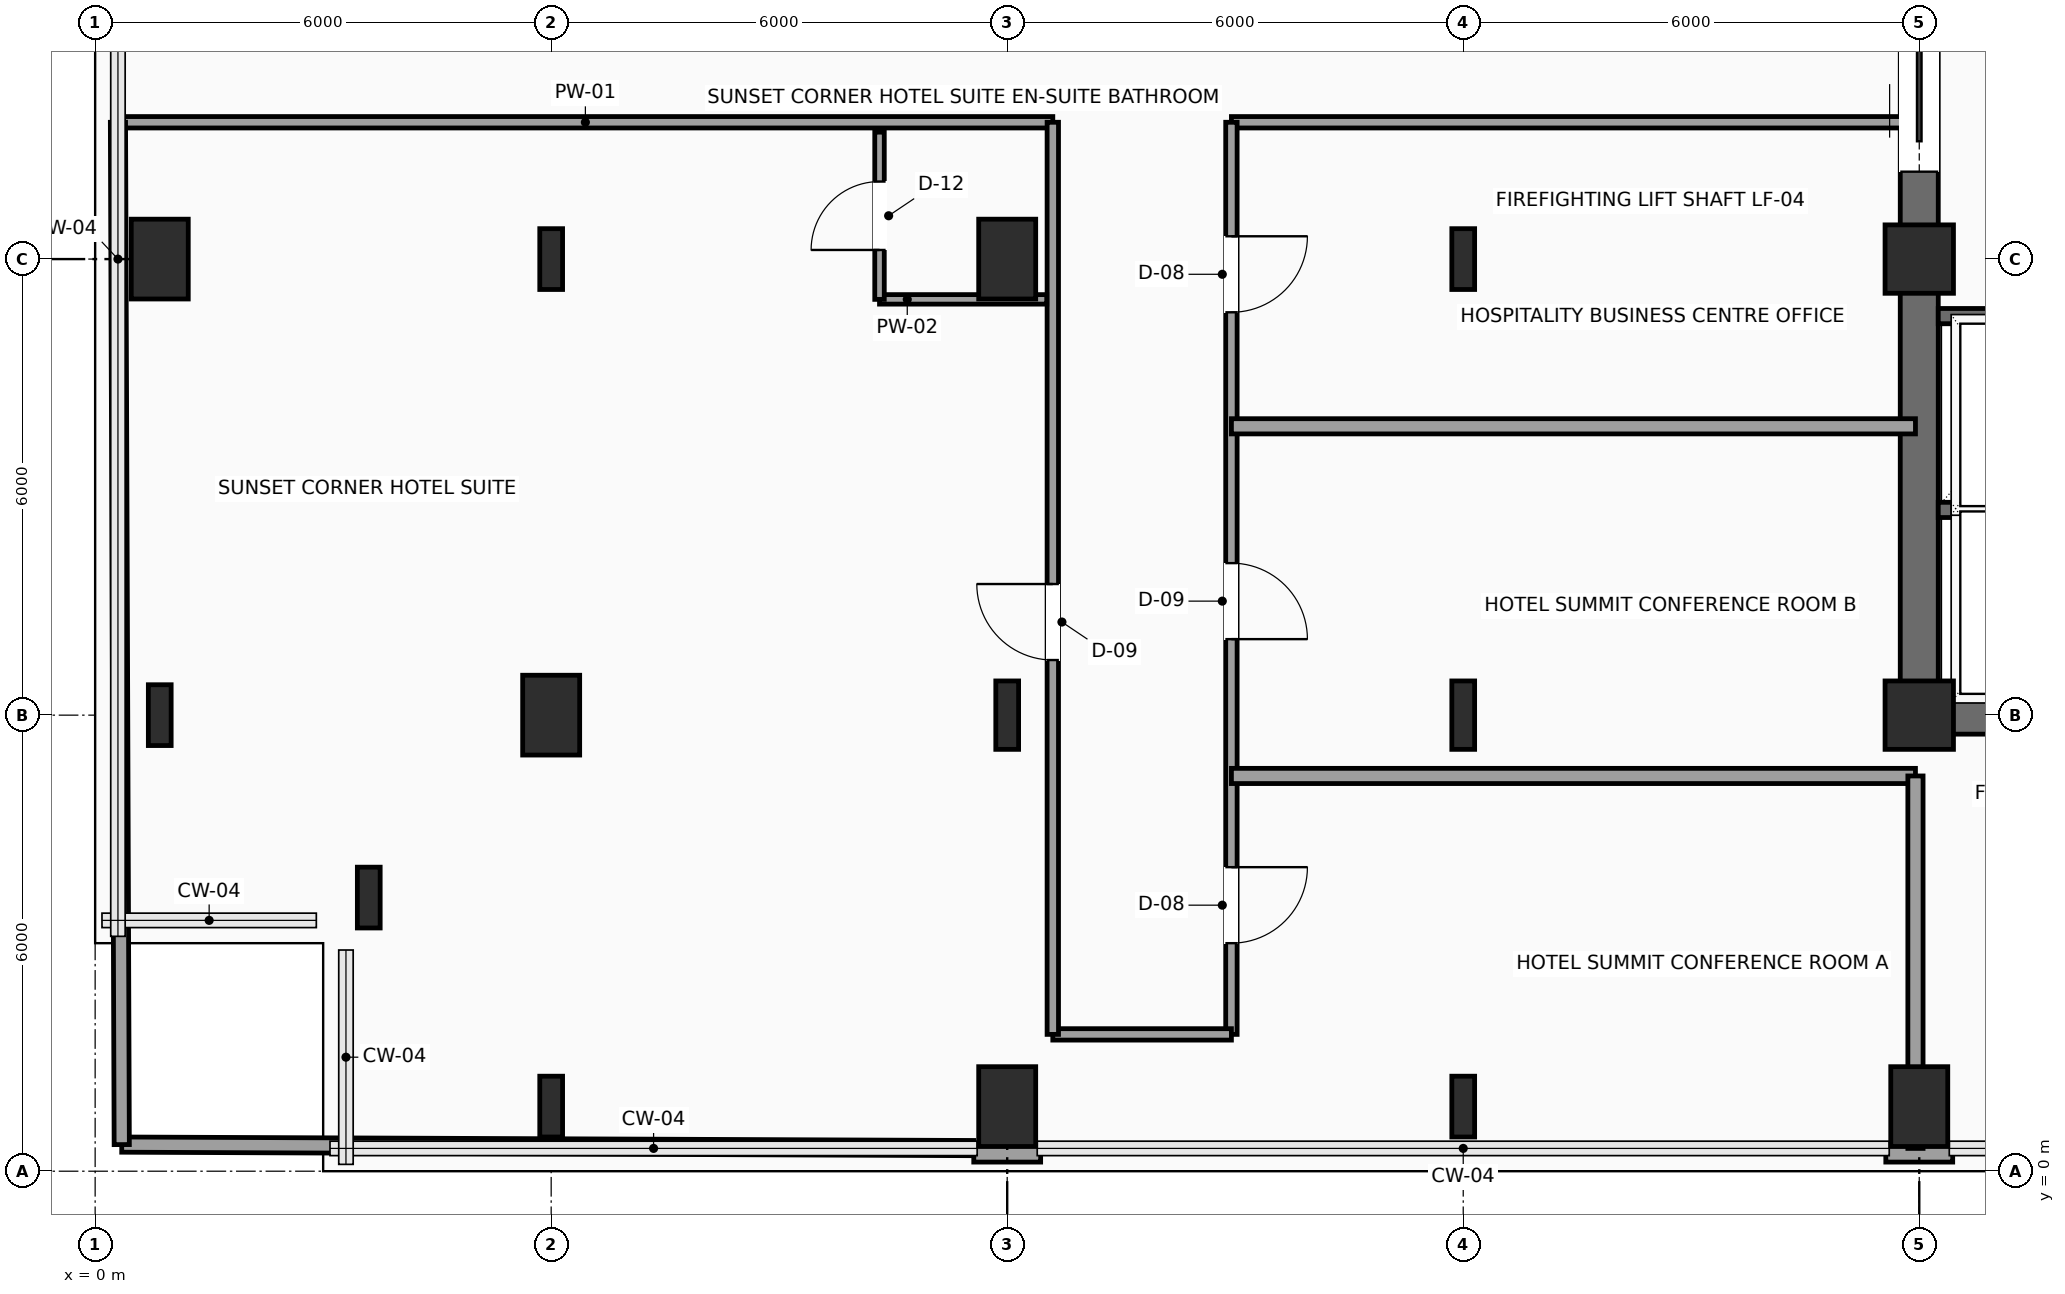
"""IFC4 building model, lengths in metres.
Left out: names, types, materials, properties, quantities, classifications, styles, units other than length and angle.
Written with IfcOpenShell. Run it as: python <this file> out.ifc"""

import sys

from ifc_helpers import new_model, si_unit, direction, frame, frame_2d, origin, origin_2d, place, context, subcontext, project, spatial, rectangle, i_section, extrude, element, fill, save


model = new_model("IFC4")
c1 = context("Model", 3, precision=1e-05, world=origin(), true_north=direction((0.0, 1.0)))
c2 = subcontext(c1, "Body", "Model", "MODEL_VIEW")
j1 = project(units=[si_unit("LENGTHUNIT", "METRE"), si_unit("PLANEANGLEUNIT", "RADIAN")], contexts=[c1])
p1 = place(None, origin())
s1 = spatial("IfcSite", under=j1, at=p1, CompositionType="ELEMENT")
p2 = place(p1, origin())
s2 = spatial("IfcBuilding", under=s1, at=p2, CompositionType="ELEMENT")
p3 = place(p2, frame((0.0, 0.0, 231.15)))
s3 = spatial("IfcBuildingStorey", under=s2, at=p3, CompositionType="ELEMENT", Elevation=231.15)
for number, where, z_axis, x_axis in (
    (1, (24.0, 6.0, 0.0), (0.0, 0.0, 1.0), (1.0, 0.0, 0.0)),
    (2, (24.0, 12.0, 0.0), (0.0, 0.0, 1.0), (1.0, 0.0, 0.0)),
):
    element("IfcColumn", number, at=place(p3, frame(where, z_axis=z_axis, x_axis=x_axis)), inside=s3, PredefinedType="COLUMN", context=c2, shape_type="SweptSolid", body=[
        extrude(rectangle(XDim=0.9, YDim=0.9, at=origin_2d()), origin(), (0.0, 0.0, 1.0), 3.75),
    ])
for number, where, z_axis, x_axis in (
    (3, (3.6, 3.6, 0.0), (0.0, 0.0, 1.0), (1.0, 0.0, 0.0)),
    (4, (0.85, 6.0, 0.0), (0.0, 0.0, 1.0), (1.0, 0.0, 0.0)),
):
    element("IfcColumn", number, at=place(p3, frame(where, z_axis=z_axis, x_axis=x_axis)), inside=s3, PredefinedType="COLUMN", context=c2, shape_type="SweptSolid", body=[
        extrude(i_section(OverallWidth=0.3, OverallDepth=0.8, WebThickness=0.018, FlangeThickness=0.033, FilletRadius=0.03, at=origin_2d()), origin(), (0.0, 0.0, 1.0), 3.75),
    ])
p4 = place(p3, frame((0.85, 12.0, 0.0), z_axis=(0.0, 0.0, 1.0), x_axis=(1.0, 0.0, 0.0)))
e5 = element("IfcColumn", 5, at=p4, inside=s3, PredefinedType="COLUMN", context=c2, shape_type="SweptSolid", body=[
    extrude(rectangle(XDim=0.75, YDim=1.05, at=origin_2d()), origin(), (0.0, 0.0, 1.0), 3.75),
])
p5 = place(p3, frame((6.0, 0.85, 0.0), z_axis=(0.0, 0.0, 1.0), x_axis=(1.0, 0.0, 0.0)))
e6 = element("IfcColumn", 6, at=p5, inside=s3, PredefinedType="COLUMN", context=c2, shape_type="SweptSolid", body=[
    extrude(i_section(OverallWidth=0.3, OverallDepth=0.8, WebThickness=0.018, FlangeThickness=0.033, FilletRadius=0.03, at=origin_2d()), origin(), (0.0, 0.0, 1.0), 3.75),
])
p6 = place(p3, frame((6.0, 6.0, 0.0), z_axis=(0.0, 0.0, 1.0), x_axis=(1.0, 0.0, 0.0)))
e7 = element("IfcColumn", 7, at=p6, inside=s3, PredefinedType="COLUMN", context=c2, shape_type="SweptSolid", body=[
    extrude(rectangle(XDim=0.75, YDim=1.05, at=origin_2d()), origin(), (0.0, 0.0, 1.0), 3.75),
])
p7 = place(p3, frame((6.0, 12.0, 0.0), z_axis=(0.0, 0.0, 1.0), x_axis=(1.0, 0.0, 0.0)))
e8 = element("IfcColumn", 8, at=p7, inside=s3, PredefinedType="COLUMN", context=c2, shape_type="SweptSolid", body=[
    extrude(i_section(OverallWidth=0.3, OverallDepth=0.8, WebThickness=0.018, FlangeThickness=0.033, FilletRadius=0.03, at=origin_2d()), origin(), (0.0, 0.0, 1.0), 3.75),
])
p8 = place(p3, frame((12.0, 0.85, 0.0), z_axis=(0.0, 0.0, 1.0), x_axis=(1.0, 0.0, 0.0)))
e9 = element("IfcColumn", 9, at=p8, inside=s3, PredefinedType="COLUMN", context=c2, shape_type="SweptSolid", body=[
    extrude(rectangle(XDim=0.75, YDim=1.05, at=origin_2d()), origin(), (0.0, 0.0, 1.0), 3.75),
])
p9 = place(p3, frame((12.0, 6.0, 0.0), z_axis=(0.0, 0.0, 1.0), x_axis=(1.0, 0.0, 0.0)))
e10 = element("IfcColumn", 10, at=p9, inside=s3, PredefinedType="COLUMN", context=c2, shape_type="SweptSolid", body=[
    extrude(i_section(OverallWidth=0.3, OverallDepth=0.9, WebThickness=0.019, FlangeThickness=0.035, FilletRadius=0.03, at=origin_2d()), origin(), (0.0, 0.0, 1.0), 3.75),
])
p10 = place(p3, frame((12.0, 12.0, 0.0), z_axis=(0.0, 0.0, 1.0), x_axis=(1.0, 0.0, 0.0)))
e11 = element("IfcColumn", 11, at=p10, inside=s3, PredefinedType="COLUMN", context=c2, shape_type="SweptSolid", body=[
    extrude(rectangle(XDim=0.75, YDim=1.05, at=origin_2d()), origin(), (0.0, 0.0, 1.0), 3.75),
])
p11 = place(p3, frame((18.0, 0.85, 0.0), z_axis=(0.0, 0.0, 1.0), x_axis=(1.0, 0.0, 0.0)))
e12 = element("IfcColumn", 12, at=p11, inside=s3, PredefinedType="COLUMN", context=c2, shape_type="SweptSolid", body=[
    extrude(i_section(OverallWidth=0.3, OverallDepth=0.8, WebThickness=0.018, FlangeThickness=0.033, FilletRadius=0.03, at=origin_2d()), origin(), (0.0, 0.0, 1.0), 3.75),
])
p12 = place(p3, frame((18.0, 6.0, 0.0), z_axis=(0.0, 0.0, 1.0), x_axis=(1.0, 0.0, 0.0)))
e13 = element("IfcColumn", 13, at=p12, inside=s3, PredefinedType="COLUMN", context=c2, shape_type="SweptSolid", body=[
    extrude(i_section(OverallWidth=0.3, OverallDepth=0.9, WebThickness=0.019, FlangeThickness=0.035, FilletRadius=0.03, at=origin_2d()), origin(), (0.0, 0.0, 1.0), 3.75),
])
p13 = place(p3, frame((18.0, 12.0, 0.0), z_axis=(0.0, 0.0, 1.0), x_axis=(1.0, 0.0, 0.0)))
e14 = element("IfcColumn", 14, at=p13, inside=s3, PredefinedType="COLUMN", context=c2, shape_type="SweptSolid", body=[
    extrude(i_section(OverallWidth=0.3, OverallDepth=0.8, WebThickness=0.018, FlangeThickness=0.033, FilletRadius=0.03, at=origin_2d()), origin(), (0.0, 0.0, 1.0), 3.75),
])
p14 = place(p3, frame((24.0, 0.85, 0.0), z_axis=(0.0, 0.0, 1.0), x_axis=(1.0, 0.0, 0.0)))
e15 = element("IfcColumn", 15, at=p14, inside=s3, PredefinedType="COLUMN", context=c2, shape_type="SweptSolid", body=[
    extrude(rectangle(XDim=0.75, YDim=1.05, at=origin_2d()), origin(), (0.0, 0.0, 1.0), 3.75),
])
for number, where, z_axis, x_axis in (
    (16, (24.44, 0.24, 0.0), (0.0, 0.0, 1.0), (-1.0, 0.0, 0.0)),
    (17, (12.44, 0.24, 0.0), (0.0, 0.0, 1.0), (-1.0, 0.0, 0.0)),
):
    element("IfcWall", number, at=place(p3, frame(where, z_axis=z_axis, x_axis=x_axis)), inside=s3, PredefinedType="SOLIDWALL", context=c2, shape_type="SweptSolid", body=[
        extrude(rectangle(XDim=0.88, YDim=0.24, at=frame_2d((0.44, 0.0))), origin(), (0.0, 0.0, 1.0), 3.425),
    ])
p15 = place(p3, frame((24.0, 6.0, 0.0), z_axis=(0.0, 0.0, 1.0), x_axis=(1.0, 0.0, 0.0)))
e18 = element("IfcWall", 18, at=p15, inside=s3, PredefinedType="SHEAR", context=c2, shape_type="SweptSolid", body=[
    extrude(rectangle(XDim=9.6, YDim=0.5, at=frame_2d((4.8, 0.0))), origin(), (0.0, 0.0, 1.0), 3.425),
])
p16 = place(p3, frame((24.0, 6.0, 0.0), z_axis=(0.0, 0.0, 1.0), x_axis=(0.0, 1.0, 0.0)))
e19 = element("IfcWall", 19, at=p16, inside=s3, PredefinedType="SHEAR", context=c2, shape_type="SweptSolid", body=[
    extrude(rectangle(XDim=12.0, YDim=0.5, at=frame_2d((6.0, 0.0))), origin(), (0.0, 0.0, 1.0), 3.425),
])
p17 = place(p16, frame((7.15, 0.0, 0.0)))
e20 = element("IfcOpeningElement", 20, at=p17, cuts=e19, PredefinedType="OPENING", context=c2, shape_type="SweptSolid", body=[
    extrude(rectangle(XDim=1.6, YDim=2.3, at=frame_2d((0.8, 1.15))), frame((0.0, 0.26, 0.0), z_axis=(0.0, -1.0, 0.0), x_axis=(1.0, 0.0, 0.0)), (0.0, 0.0, 1.0), 0.52),
])
for number, where, z_axis, x_axis in (
    (21, (24.25, 8.7, 0.0), (0.0, 0.0, 1.0), (1.0, 0.0, 0.0)),
    (22, (24.25, 11.25, 0.0), (0.0, 0.0, 1.0), (1.0, 0.0, 0.0)),
):
    element("IfcWall", number, at=place(p3, frame(where, z_axis=z_axis, x_axis=x_axis)), inside=s3, PredefinedType="SHEAR", context=c2, shape_type="SweptSolid", body=[
        extrude(rectangle(XDim=2.17, YDim=0.2, at=frame_2d((1.085, 0.0))), origin(), (0.0, 0.0, 1.0), 3.425),
    ])
p18 = place(p3, frame((12.6, 13.8, 0.0), z_axis=(0.0, 0.0, 1.0), x_axis=(-1.0, 0.0, 0.0)))
e23 = element("IfcWall", 23, at=p18, inside=s3, PredefinedType="PARTITIONING", context=c2, shape_type="SweptSolid", body=[
    extrude(rectangle(XDim=12.3, YDim=0.15, at=frame_2d((6.15, 0.0))), origin(), (0.0, 0.0, 1.0), 3.425),
])
p19 = place(p3, frame((23.95, 13.8, 0.0), z_axis=(0.0, 0.0, 1.0), x_axis=(-1.0, 0.0, 0.0)))
e24 = element("IfcWall", 24, at=p19, inside=s3, PredefinedType="PARTITIONING", context=c2, shape_type="SweptSolid", body=[
    extrude(rectangle(XDim=9.0, YDim=0.15, at=frame_2d((4.5, 0.0))), origin(), (0.0, 0.0, 1.0), 3.425),
])
p20 = place(p3, frame((14.95, 13.8, 0.0), z_axis=(0.0, 0.0, 1.0), x_axis=(0.0, -1.0, 0.0)))
e25 = element("IfcWall", 25, at=p20, inside=s3, PredefinedType="PARTITIONING", context=c2, shape_type="SweptSolid", body=[
    extrude(rectangle(XDim=12.0, YDim=0.15, at=frame_2d((6.0, 0.0))), origin(), (0.0, 0.0, 1.0), 3.425),
])
p21 = place(p20, frame((9.8, 0.0, 0.0)))
e26 = element("IfcOpeningElement", 26, at=p21, cuts=e25, PredefinedType="OPENING", context=c2, shape_type="SweptSolid", body=[
    extrude(rectangle(XDim=1.0, YDim=2.2, at=frame_2d((0.5, 1.1))), frame((0.0, 0.085, 0.0), z_axis=(0.0, -1.0, 0.0), x_axis=(1.0, 0.0, 0.0)), (0.0, 0.0, 1.0), 0.17),
])
p22 = place(p20, frame((5.8, 0.0, 0.0)))
e27 = element("IfcOpeningElement", 27, at=p22, cuts=e25, PredefinedType="OPENING", context=c2, shape_type="SweptSolid", body=[
    extrude(rectangle(XDim=1.0, YDim=2.2, at=frame_2d((0.5, 1.1))), frame((0.0, 0.085, 0.0), z_axis=(0.0, -1.0, 0.0), x_axis=(1.0, 0.0, 0.0)), (0.0, 0.0, 1.0), 0.17),
])
p23 = place(p20, frame((1.5, 0.0, 0.0)))
e28 = element("IfcOpeningElement", 28, at=p23, cuts=e25, PredefinedType="OPENING", context=c2, shape_type="SweptSolid", body=[
    extrude(rectangle(XDim=1.0, YDim=2.2, at=frame_2d((0.5, 1.1))), frame((0.0, 0.085, 0.0), z_axis=(0.0, -1.0, 0.0), x_axis=(1.0, 0.0, 0.0)), (0.0, 0.0, 1.0), 0.17),
])
p24 = place(p3, frame((14.95, 1.8, 0.0), z_axis=(0.0, 0.0, 1.0), x_axis=(-1.0, 0.0, 0.0)))
e29 = element("IfcWall", 29, at=p24, inside=s3, PredefinedType="PARTITIONING", context=c2, shape_type="SweptSolid", body=[
    extrude(rectangle(XDim=2.35, YDim=0.15, at=frame_2d((1.175, 0.0))), origin(), (0.0, 0.0, 1.0), 3.425),
])
p25 = place(p3, frame((12.6, 1.8, 0.0), z_axis=(0.0, 0.0, 1.0), x_axis=(0.0, 1.0, 0.0)))
e30 = element("IfcWall", 30, at=p25, inside=s3, PredefinedType="PARTITIONING", context=c2, shape_type="SweptSolid", body=[
    extrude(rectangle(XDim=12.0, YDim=0.15, at=frame_2d((6.0, 0.0))), origin(), (0.0, 0.0, 1.0), 3.425),
])
p26 = place(p25, frame((4.925, 0.0, 0.0)))
e31 = element("IfcOpeningElement", 31, at=p26, cuts=e30, PredefinedType="OPENING", context=c2, shape_type="SweptSolid", body=[
    extrude(rectangle(XDim=1.0, YDim=2.2, at=frame_2d((0.5, 1.1))), frame((0.0, 0.085, 0.0), z_axis=(0.0, -1.0, 0.0), x_axis=(1.0, 0.0, 0.0)), (0.0, 0.0, 1.0), 0.17),
])
p27 = place(p3, frame((0.35, 0.35, 0.0), z_axis=(0.0, 0.0, 1.0), x_axis=(0.999991617913, -0.004094398993, 0.0)))
e32 = element("IfcWall", 32, at=p27, inside=s3, PredefinedType="PARTITIONING", context=c2, shape_type="SweptSolid", body=[
    extrude(rectangle(XDim=11.21, YDim=0.2, at=frame_2d((5.605, 0.0))), origin(), (0.0, 0.0, 1.0), 3.425),
])
p28 = place(p3, frame((0.35, 0.35, 0.0), z_axis=(0.0, 0.0, 1.0), x_axis=(-0.003721090209, 0.99999307672, 0.0)))
e33 = element("IfcWall", 33, at=p28, inside=s3, PredefinedType="PARTITIONING", context=c2, shape_type="SweptSolid", body=[
    extrude(rectangle(XDim=13.45, YDim=0.2, at=frame_2d((6.725, 0.0))), origin(), (0.0, 0.0, 1.0), 3.425),
])
p29 = place(p3, frame((10.32, 11.47, 0.0), z_axis=(0.0, 0.0, 1.0), x_axis=(1.0, 0.0, 0.0)))
e34 = element("IfcWall", 34, at=p29, inside=s3, PredefinedType="PARTITIONING", context=c2, shape_type="SweptSolid", body=[
    extrude(rectangle(XDim=2.2, YDim=0.125, at=frame_2d((1.1, 0.0))), origin(), (0.0, 0.0, 1.0), 3.425),
])
p30 = place(p3, frame((10.32, 11.47, 0.0), z_axis=(0.0, 0.0, 1.0), x_axis=(0.0, 1.0, 0.0)))
e35 = element("IfcWall", 35, at=p30, inside=s3, PredefinedType="PARTITIONING", context=c2, shape_type="SweptSolid", body=[
    extrude(rectangle(XDim=2.2, YDim=0.125, at=frame_2d((1.1, 0.0))), origin(), (0.0, 0.0, 1.0), 3.425),
])
p31 = place(p30, frame((0.65, 0.0, 0.0)))
e36 = element("IfcOpeningElement", 36, at=p31, cuts=e35, PredefinedType="OPENING", context=c2, shape_type="SweptSolid", body=[
    extrude(rectangle(XDim=0.9, YDim=2.1, at=frame_2d((0.45, 1.05))), frame((0.0, 0.073, 0.0), z_axis=(0.0, -1.0, 0.0), x_axis=(1.0, 0.0, 0.0)), (0.0, 0.0, 1.0), 0.145),
])
p32 = place(p3, frame((14.95, 5.2, 0.0), z_axis=(0.0, 0.0, 1.0), x_axis=(1.0, 0.0, 0.0)))
e37 = element("IfcWall", 37, at=p32, inside=s3, PredefinedType="PARTITIONING", context=c2, shape_type="SweptSolid", body=[
    extrude(rectangle(XDim=9.0, YDim=0.2, at=frame_2d((4.5, 0.0))), origin(), (0.0, 0.0, 1.0), 3.425),
])
p33 = place(p3, frame((23.95, 0.3, 0.0), z_axis=(0.0, 0.0, 1.0), x_axis=(0.0, 1.0, 0.0)))
e38 = element("IfcWall", 38, at=p33, inside=s3, PredefinedType="PARTITIONING", context=c2, shape_type="SweptSolid", body=[
    extrude(rectangle(XDim=4.9, YDim=0.2, at=frame_2d((2.45, 0.0))), origin(), (0.0, 0.0, 1.0), 3.017),
])
p34 = place(p3, frame((14.95, 9.8, 0.0), z_axis=(0.0, 0.0, 1.0), x_axis=(1.0, 0.0, 0.0)))
e39 = element("IfcWall", 39, at=p34, inside=s3, PredefinedType="PARTITIONING", context=c2, shape_type="SweptSolid", body=[
    extrude(rectangle(XDim=9.0, YDim=0.2, at=frame_2d((4.5, 0.0))), origin(), (0.0, 0.0, 1.0), 3.425),
])
p35 = place(p17, origin())
e40 = element("IfcDoor", 40, at=p35, inside=s3, OperationType="DOUBLE_DOOR_SLIDING", PredefinedType="DOOR", context=c2, shape_type="SweptSolid", body=[
    extrude(rectangle(XDim=1.6, YDim=2.3, at=frame_2d((0.8, 1.15))), frame((0.0, 0.025, 0.0), z_axis=(0.0, -1.0, 0.0), x_axis=(1.0, 0.0, 0.0)), (0.0, 0.0, 1.0), 0.05),
])
fill(e20, e40)
p36 = place(p21, origin())
e41 = element("IfcDoor", 41, at=p36, inside=s3, OperationType="SINGLE_SWING_LEFT", PredefinedType="DOOR", context=c2, shape_type="SweptSolid", body=[
    extrude(rectangle(XDim=1.0, YDim=2.2, at=frame_2d((0.5, 1.1))), frame((0.0, 0.025, 0.0), z_axis=(0.0, -1.0, 0.0), x_axis=(1.0, 0.0, 0.0)), (0.0, 0.0, 1.0), 0.05),
])
fill(e26, e41)
p37 = place(p22, origin())
e42 = element("IfcDoor", 42, at=p37, inside=s3, OperationType="SINGLE_SWING_RIGHT", PredefinedType="DOOR", context=c2, shape_type="SweptSolid", body=[
    extrude(rectangle(XDim=1.0, YDim=2.2, at=frame_2d((0.5, 1.1))), frame((0.0, 0.025, 0.0), z_axis=(0.0, -1.0, 0.0), x_axis=(1.0, 0.0, 0.0)), (0.0, 0.0, 1.0), 0.05),
])
fill(e27, e42)
p38 = place(p23, origin())
e43 = element("IfcDoor", 43, at=p38, inside=s3, OperationType="SINGLE_SWING_LEFT", PredefinedType="DOOR", context=c2, shape_type="SweptSolid", body=[
    extrude(rectangle(XDim=1.0, YDim=2.2, at=frame_2d((0.5, 1.1))), frame((0.0, 0.025, 0.0), z_axis=(0.0, -1.0, 0.0), x_axis=(1.0, 0.0, 0.0)), (0.0, 0.0, 1.0), 0.05),
])
fill(e28, e43)
p39 = place(p26, origin())
e44 = element("IfcDoor", 44, at=p39, inside=s3, OperationType="SINGLE_SWING_RIGHT", PredefinedType="DOOR", context=c2, shape_type="SweptSolid", body=[
    extrude(rectangle(XDim=1.0, YDim=2.2, at=frame_2d((0.5, 1.1))), frame((0.0, 0.025, 0.0), z_axis=(0.0, -1.0, 0.0), x_axis=(1.0, 0.0, 0.0)), (0.0, 0.0, 1.0), 0.05),
])
fill(e31, e44)
p40 = place(p31, origin())
e45 = element("IfcDoor", 45, at=p40, inside=s3, OperationType="SINGLE_SWING_LEFT", PredefinedType="DOOR", context=c2, shape_type="SweptSolid", body=[
    extrude(rectangle(XDim=0.9, YDim=2.1, at=frame_2d((0.45, 1.05))), frame((0.0, 0.025, 0.0), z_axis=(0.0, -1.0, 0.0), x_axis=(1.0, 0.0, 0.0)), (0.0, 0.0, 1.0), 0.05),
])
fill(e36, e45)
save(model, sys.argv[1])
